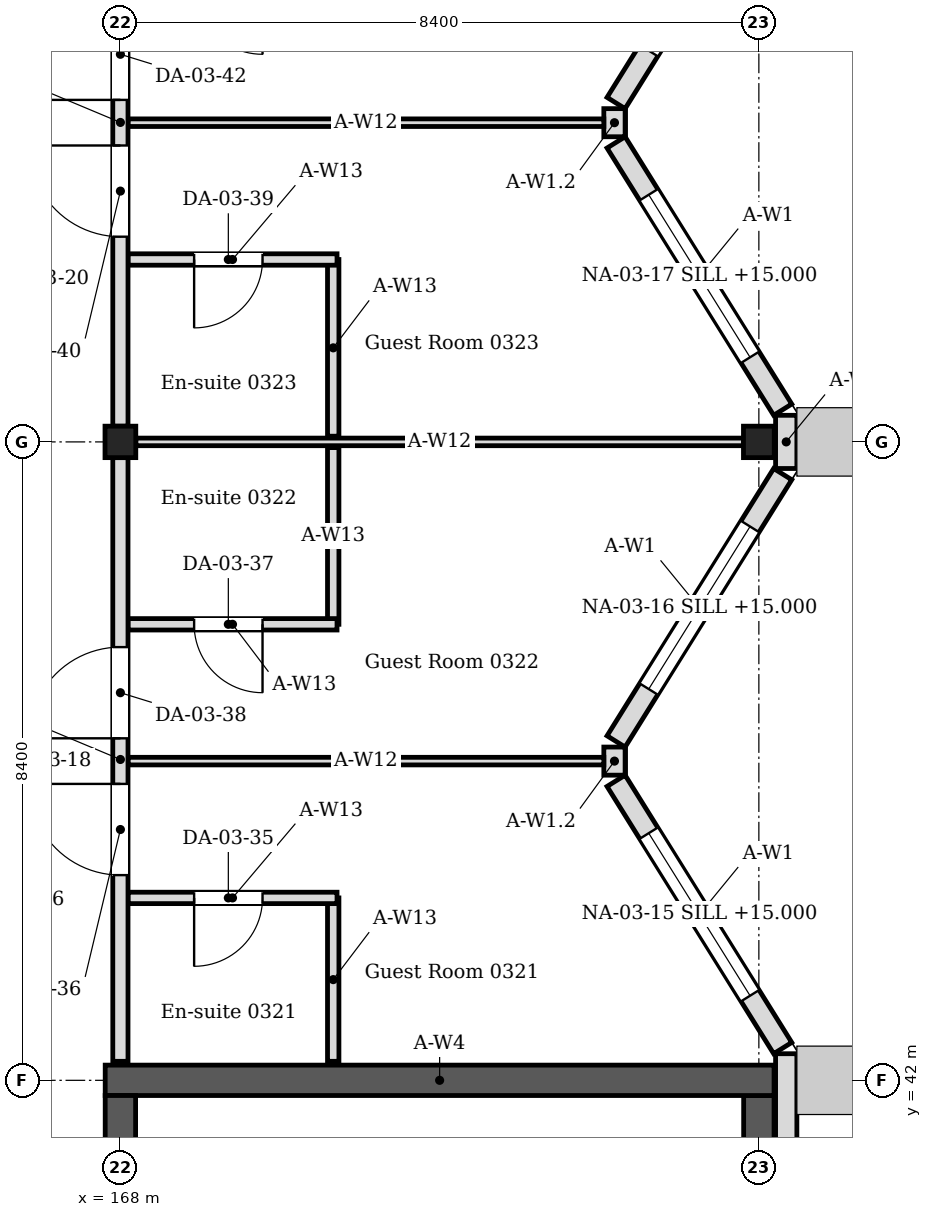
"""IFC4 building model, lengths in metres.
Left out: names, types, materials, properties, quantities, classifications, styles, units other than length and angle.
Written with IfcOpenShell. Run it as: python <this file> out.ifc"""

import sys

from ifc_helpers import new_model, si_unit, direction, frame, frame_2d, origin, origin_2d, place, context, subcontext, project, spatial, rectangle, i_section, extrude, element, fill, save


model = new_model("IFC4")
c1 = context("Model", 3, precision=1e-05, world=origin(), true_north=direction((0.0, 1.0)))
c2 = subcontext(c1, "Body", "Model", "MODEL_VIEW")
j1 = project(units=[si_unit("LENGTHUNIT", "METRE"), si_unit("PLANEANGLEUNIT", "RADIAN")], contexts=[c1])
p1 = place(None, origin())
s1 = spatial("IfcSite", under=j1, at=p1, CompositionType="ELEMENT")
p2 = place(p1, origin())
s2 = spatial("IfcBuilding", under=s1, at=p2, CompositionType="ELEMENT")
p3 = place(p2, frame((0.0, 0.0, 14.4)))
s3 = spatial("IfcBuildingStorey", under=s2, at=p3, CompositionType="ELEMENT", Elevation=14.4)
for number, where, z_axis, x_axis in (
    (1, (168.0, 50.4, 0.0), (0.0, 0.0, 1.0), (1.0, 0.0, 0.0)),
    (2, (176.4, 50.4, 0.0), (0.0, 0.0, 1.0), (1.0, 0.0, 0.0)),
):
    element("IfcColumn", number, at=place(p3, frame(where, z_axis=z_axis, x_axis=x_axis)), inside=s3, PredefinedType="COLUMN", context=c2, shape_type="SweptSolid", body=[
        extrude(i_section(OverallWidth=0.405, OverallDepth=0.414, WebThickness=0.018, FlangeThickness=0.028, FilletRadius=0.022, at=origin_2d()), origin(), (0.0, 0.0, 1.0), 4.2),
    ])
p4 = place(p3, frame((167.8, 42.0, 0.0), z_axis=(0.0, 0.0, 1.0), x_axis=(1.0, 0.0, 0.0)))
e3 = element("IfcWall", 3, at=p4, inside=s3, PredefinedType="SOLIDWALL", context=c2, shape_type="SweptSolid", body=[
    extrude(rectangle(XDim=8.8, YDim=0.4, at=frame_2d((4.4, 0.0))), origin(), (0.0, 0.0, 1.0), 4.05),
])
p5 = place(p3, frame((168.0, 25.4, 0.0), z_axis=(0.0, 0.0, 1.0), x_axis=(0.0, 1.0, 0.0)))
e4 = element("IfcWall", 4, at=p5, inside=s3, PredefinedType="SOLIDWALL", context=c2, shape_type="SweptSolid", body=[
    extrude(rectangle(XDim=16.4, YDim=0.4, at=frame_2d((8.2, 0.0))), origin(), (0.0, 0.0, 1.0), 4.05),
])
p6 = place(p5, frame((1.0, 0.0, 0.0)))
e5 = element("IfcOpeningElement", 5, at=p6, cuts=e4, PredefinedType="OPENING", context=c2, shape_type="SweptSolid", body=[
    extrude(rectangle(XDim=1.0, YDim=2.1, at=frame_2d((0.5, 1.05))), frame((0.0, 0.21, 0.0), z_axis=(0.0, -1.0, 0.0), x_axis=(1.0, 0.0, 0.0)), (0.0, 0.0, 1.0), 0.42),
])
p7 = place(p5, frame((14.4, 0.0, 0.0)))
e6 = element("IfcOpeningElement", 6, at=p7, cuts=e4, PredefinedType="OPENING", context=c2, shape_type="SweptSolid", body=[
    extrude(rectangle(XDim=1.4, YDim=2.1, at=frame_2d((0.7, 1.05))), frame((0.0, 0.21, 0.0), z_axis=(0.0, -1.0, 0.0), x_axis=(1.0, 0.0, 0.0)), (0.0, 0.0, 1.0), 0.42),
])
p8 = place(p3, frame((176.4, 25.4, 0.0), z_axis=(0.0, 0.0, 1.0), x_axis=(0.0, 1.0, 0.0)))
e7 = element("IfcWall", 7, at=p8, inside=s3, PredefinedType="SOLIDWALL", context=c2, shape_type="SweptSolid", body=[
    extrude(rectangle(XDim=16.4, YDim=0.4, at=frame_2d((8.2, 0.0))), origin(), (0.0, 0.0, 1.0), 4.05),
])
p9 = place(p3, frame((176.76, -0.22, 0.0), z_axis=(0.0, 0.0, 1.0), x_axis=(0.0, 1.0, 0.0)))
e8 = element("IfcWall", 8, at=p9, inside=s3, PredefinedType="SOLIDWALL", context=c2, shape_type="SweptSolid", body=[
    extrude(rectangle(XDim=42.57, YDim=0.28, at=frame_2d((21.285, 0.0))), origin(), (0.0, 0.0, 1.0), 4.05),
])
p10 = place(p9, frame((9.46, 0.0, 0.6)))
e9 = element("IfcOpeningElement", 9, at=p10, cuts=e8, PredefinedType="OPENING", context=c2, shape_type="SweptSolid", body=[
    extrude(rectangle(XDim=2.52, YDim=2.4, at=frame_2d((1.26, 1.2))), frame((0.0, 0.15, 0.0), z_axis=(0.0, -1.0, 0.0), x_axis=(1.0, 0.0, 0.0)), (0.0, 0.0, 1.0), 0.3),
])
p11 = place(p9, frame((13.66, 0.0, 0.6)))
e10 = element("IfcOpeningElement", 10, at=p11, cuts=e8, PredefinedType="OPENING", context=c2, shape_type="SweptSolid", body=[
    extrude(rectangle(XDim=2.52, YDim=2.4, at=frame_2d((1.26, 1.2))), frame((0.0, 0.15, 0.0), z_axis=(0.0, -1.0, 0.0), x_axis=(1.0, 0.0, 0.0)), (0.0, 0.0, 1.0), 0.3),
])
p12 = place(p9, frame((17.44, 0.0, 0.6)))
e11 = element("IfcOpeningElement", 11, at=p12, cuts=e8, PredefinedType="OPENING", context=c2, shape_type="SweptSolid", body=[
    extrude(rectangle(XDim=2.52, YDim=2.4, at=frame_2d((1.26, 1.2))), frame((0.0, 0.15, 0.0), z_axis=(0.0, -1.0, 0.0), x_axis=(1.0, 0.0, 0.0)), (0.0, 0.0, 1.0), 0.3),
])
p13 = place(p9, frame((21.64, 0.0, 0.6)))
e12 = element("IfcOpeningElement", 12, at=p13, cuts=e8, PredefinedType="OPENING", context=c2, shape_type="SweptSolid", body=[
    extrude(rectangle(XDim=2.52, YDim=2.4, at=frame_2d((1.26, 1.2))), frame((0.0, 0.15, 0.0), z_axis=(0.0, -1.0, 0.0), x_axis=(1.0, 0.0, 0.0)), (0.0, 0.0, 1.0), 0.3),
])
p14 = place(p3, frame((176.714, 42.424, 0.0), z_axis=(0.0, 0.0, 1.0), x_axis=(-0.529018946142, 0.848610013271, 0.0)))
e13 = element("IfcWall", 13, at=p14, inside=s3, PredefinedType="SOLIDWALL", context=c2, shape_type="SweptSolid", body=[
    extrude(rectangle(XDim=4.144, YDim=0.28, at=frame_2d((2.072, 0.0))), origin(), (0.0, 0.0, 1.0), 4.05),
])
p15 = place(p14, frame((0.812, 0.0, 0.6)))
e14 = element("IfcOpeningElement", 14, at=p15, cuts=e13, PredefinedType="OPENING", context=c2, shape_type="SweptSolid", body=[
    extrude(rectangle(XDim=2.52, YDim=2.4, at=frame_2d((1.26, 1.2))), frame((0.0, 0.15, 0.0), z_axis=(0.0, -1.0, 0.0), x_axis=(1.0, 0.0, 0.0)), (0.0, 0.0, 1.0), 0.3),
])
p16 = place(p3, frame((174.521, 46.459, 0.0), z_axis=(0.0, 0.0, 1.0), x_axis=(0.529018946142, 0.848610013271, 0.0)))
e15 = element("IfcWall", 15, at=p16, inside=s3, PredefinedType="SOLIDWALL", context=c2, shape_type="SweptSolid", body=[
    extrude(rectangle(XDim=4.144, YDim=0.28, at=frame_2d((2.072, 0.0))), origin(), (0.0, 0.0, 1.0), 4.05),
])
p17 = place(p16, frame((0.812, 0.0, 0.6)))
e16 = element("IfcOpeningElement", 16, at=p17, cuts=e15, PredefinedType="OPENING", context=c2, shape_type="SweptSolid", body=[
    extrude(rectangle(XDim=2.52, YDim=2.4, at=frame_2d((1.26, 1.2))), frame((0.0, 0.15, 0.0), z_axis=(0.0, -1.0, 0.0), x_axis=(1.0, 0.0, 0.0)), (0.0, 0.0, 1.0), 0.3),
])
p18 = place(p3, frame((174.5, 46.015, 0.0), z_axis=(0.0, 0.0, 1.0), x_axis=(0.0, 1.0, 0.0)))
e17 = element("IfcWall", 17, at=p18, inside=s3, PredefinedType="SOLIDWALL", context=c2, shape_type="SweptSolid", body=[
    extrude(rectangle(XDim=0.37, YDim=0.28, at=frame_2d((0.185, 0.0))), origin(), (0.0, 0.0, 1.0), 3.604),
])
p19 = place(p3, frame((176.76, 50.05, 0.0), z_axis=(0.0, 0.0, 1.0), x_axis=(0.0, 1.0, 0.0)))
e18 = element("IfcWall", 18, at=p19, inside=s3, PredefinedType="SOLIDWALL", context=c2, shape_type="SweptSolid", body=[
    extrude(rectangle(XDim=0.7, YDim=0.28, at=frame_2d((0.35, 0.0))), origin(), (0.0, 0.0, 1.0), 4.05),
])
p20 = place(p3, frame((176.714, 50.824, 0.0), z_axis=(0.0, 0.0, 1.0), x_axis=(-0.529018946142, 0.848610013271, 0.0)))
e19 = element("IfcWall", 19, at=p20, inside=s3, PredefinedType="SOLIDWALL", context=c2, shape_type="SweptSolid", body=[
    extrude(rectangle(XDim=4.144, YDim=0.28, at=frame_2d((2.072, 0.0))), origin(), (0.0, 0.0, 1.0), 4.05),
])
p21 = place(p20, frame((0.812, 0.0, 0.6)))
e20 = element("IfcOpeningElement", 20, at=p21, cuts=e19, PredefinedType="OPENING", context=c2, shape_type="SweptSolid", body=[
    extrude(rectangle(XDim=2.52, YDim=2.4, at=frame_2d((1.26, 1.2))), frame((0.0, 0.15, 0.0), z_axis=(0.0, -1.0, 0.0), x_axis=(1.0, 0.0, 0.0)), (0.0, 0.0, 1.0), 0.3),
])
p22 = place(p3, frame((174.521, 54.859, 0.0), z_axis=(0.0, 0.0, 1.0), x_axis=(0.528992500338, 0.848626498871, 0.0)))
e21 = element("IfcWall", 21, at=p22, inside=s3, PredefinedType="SOLIDWALL", context=c2, shape_type="SweptSolid", body=[
    extrude(rectangle(XDim=4.145, YDim=0.28, at=frame_2d((2.072, 0.0))), origin(), (0.0, 0.0, 1.0), 4.05),
])
p23 = place(p22, frame((0.812, 0.0, 0.6)))
e22 = element("IfcOpeningElement", 22, at=p23, cuts=e21, PredefinedType="OPENING", context=c2, shape_type="SweptSolid", body=[
    extrude(rectangle(XDim=2.52, YDim=2.4, at=frame_2d((1.26, 1.2))), frame((0.0, 0.15, 0.0), z_axis=(0.0, -1.0, 0.0), x_axis=(1.0, 0.0, 0.0)), (0.0, 0.0, 1.0), 0.3),
])
p24 = place(p3, frame((174.5, 54.415, 0.0), z_axis=(0.0, 0.0, 1.0), x_axis=(0.0, 1.0, 0.0)))
e23 = element("IfcWall", 23, at=p24, inside=s3, PredefinedType="SOLIDWALL", context=c2, shape_type="SweptSolid", body=[
    extrude(rectangle(XDim=0.37, YDim=0.28, at=frame_2d((0.185, 0.0))), origin(), (0.0, 0.0, 1.0), 3.604),
])
p25 = place(p3, frame((170.8, 42.25, 0.0), z_axis=(0.0, 0.0, 1.0), x_axis=(0.0, 1.0, 0.0)))
e24 = element("IfcWall", 24, at=p25, inside=s3, PredefinedType="PARTITIONING", context=c2, shape_type="SweptSolid", body=[
    extrude(rectangle(XDim=2.15, YDim=0.15, at=frame_2d((1.075, 0.0))), origin(), (0.0, 0.0, 1.0), 4.05),
])
p26 = place(p3, frame((170.85, 44.4, 0.0), z_axis=(0.0, 0.0, 1.0), x_axis=(-1.0, 0.0, 0.0)))
e25 = element("IfcWall", 25, at=p26, inside=s3, PredefinedType="PARTITIONING", context=c2, shape_type="SweptSolid", body=[
    extrude(rectangle(XDim=2.75, YDim=0.15, at=frame_2d((1.375, 0.0))), origin(), (0.0, 0.0, 1.0), 4.05),
])
p27 = place(p26, frame((0.98, 0.0, 0.0)))
e26 = element("IfcOpeningElement", 26, at=p27, cuts=e25, PredefinedType="OPENING", context=c2, shape_type="SweptSolid", body=[
    extrude(rectangle(XDim=0.9, YDim=2.1, at=frame_2d((0.45, 1.05))), frame((0.0, 0.085, 0.0), z_axis=(0.0, -1.0, 0.0), x_axis=(1.0, 0.0, 0.0)), (0.0, 0.0, 1.0), 0.17),
])
p28 = place(p3, frame((170.8, 48.0, 0.0), z_axis=(0.0, 0.0, 1.0), x_axis=(0.0, 1.0, 0.0)))
e27 = element("IfcWall", 27, at=p28, inside=s3, PredefinedType="PARTITIONING", context=c2, shape_type="SweptSolid", body=[
    extrude(rectangle(XDim=2.325, YDim=0.15, at=frame_2d((1.163, 0.0))), origin(), (0.0, 0.0, 1.0), 4.05),
])
p29 = place(p3, frame((170.85, 48.0, 0.0), z_axis=(0.0, 0.0, 1.0), x_axis=(-1.0, 0.0, 0.0)))
e28 = element("IfcWall", 28, at=p29, inside=s3, PredefinedType="PARTITIONING", context=c2, shape_type="SweptSolid", body=[
    extrude(rectangle(XDim=2.75, YDim=0.15, at=frame_2d((1.375, 0.0))), origin(), (0.0, 0.0, 1.0), 4.05),
])
p30 = place(p29, frame((0.98, 0.0, 0.0)))
e29 = element("IfcOpeningElement", 29, at=p30, cuts=e28, PredefinedType="OPENING", context=c2, shape_type="SweptSolid", body=[
    extrude(rectangle(XDim=0.9, YDim=2.1, at=frame_2d((0.45, 1.05))), frame((0.0, 0.085, 0.0), z_axis=(0.0, -1.0, 0.0), x_axis=(1.0, 0.0, 0.0)), (0.0, 0.0, 1.0), 0.17),
])
p31 = place(p3, frame((170.8, 50.475, 0.0), z_axis=(0.0, 0.0, 1.0), x_axis=(0.0, 1.0, 0.0)))
e30 = element("IfcWall", 30, at=p31, inside=s3, PredefinedType="PARTITIONING", context=c2, shape_type="SweptSolid", body=[
    extrude(rectangle(XDim=2.325, YDim=0.15, at=frame_2d((1.163, 0.0))), origin(), (0.0, 0.0, 1.0), 4.05),
])
p32 = place(p3, frame((170.85, 52.8, 0.0), z_axis=(0.0, 0.0, 1.0), x_axis=(-1.0, 0.0, 0.0)))
e31 = element("IfcWall", 31, at=p32, inside=s3, PredefinedType="PARTITIONING", context=c2, shape_type="SweptSolid", body=[
    extrude(rectangle(XDim=2.75, YDim=0.15, at=frame_2d((1.375, 0.0))), origin(), (0.0, 0.0, 1.0), 4.05),
])
p33 = place(p32, frame((0.98, 0.0, 0.0)))
e32 = element("IfcOpeningElement", 32, at=p33, cuts=e31, PredefinedType="OPENING", context=c2, shape_type="SweptSolid", body=[
    extrude(rectangle(XDim=0.9, YDim=2.1, at=frame_2d((0.45, 1.05))), frame((0.0, 0.085, 0.0), z_axis=(0.0, -1.0, 0.0), x_axis=(1.0, 0.0, 0.0)), (0.0, 0.0, 1.0), 0.17),
])
p34 = place(p3, frame((168.202, 50.4, 0.0), z_axis=(0.0, 0.0, 1.0), x_axis=(1.0, 0.0, 0.0)))
e33 = element("IfcWall", 33, at=p34, inside=s3, PredefinedType="PARTITIONING", context=c2, shape_type="SweptSolid", body=[
    extrude(rectangle(XDim=7.995, YDim=0.1, at=frame_2d((3.998, 0.0))), origin(), (0.0, 0.0, 1.0), 3.604),
])
for number, where, z_axis, x_axis in (
    (34, (168.1, 46.2, 0.0), (0.0, 0.0, 1.0), (1.0, 0.0, 0.0)),
    (35, (168.1, 54.6, 0.0), (0.0, 0.0, 1.0), (1.0, 0.0, 0.0)),
):
    element("IfcWall", number, at=place(p3, frame(where, z_axis=z_axis, x_axis=x_axis)), inside=s3, PredefinedType="PARTITIONING", context=c2, shape_type="SweptSolid", body=[
        extrude(rectangle(XDim=6.26, YDim=0.1, at=frame_2d((3.13, 0.0))), origin(), (0.0, 0.0, 1.0), 3.604),
    ])
p35 = place(p3, frame((168.0, 42.25, 0.0), z_axis=(0.0, 0.0, 1.0), x_axis=(0.0, 1.0, 0.0)))
e36 = element("IfcWall", 36, at=p35, inside=s3, PredefinedType="PARTITIONING", context=c2, shape_type="SweptSolid", body=[
    extrude(rectangle(XDim=7.943, YDim=0.2, at=frame_2d((3.972, 0.0))), origin(), (0.0, 0.0, 1.0), 3.45),
])
p36 = place(p35, frame((2.45, 0.0, 0.0)))
e37 = element("IfcOpeningElement", 37, at=p36, cuts=e36, PredefinedType="OPENING", context=c2, shape_type="SweptSolid", body=[
    extrude(rectangle(XDim=1.2, YDim=2.1, at=frame_2d((0.6, 1.05))), frame((0.0, 0.11, 0.0), z_axis=(0.0, -1.0, 0.0), x_axis=(1.0, 0.0, 0.0)), (0.0, 0.0, 1.0), 0.22),
])
p37 = place(p35, frame((4.25, 0.0, 0.0)))
e38 = element("IfcOpeningElement", 38, at=p37, cuts=e36, PredefinedType="OPENING", context=c2, shape_type="SweptSolid", body=[
    extrude(rectangle(XDim=1.2, YDim=2.1, at=frame_2d((0.6, 1.05))), frame((0.0, 0.11, 0.0), z_axis=(0.0, -1.0, 0.0), x_axis=(1.0, 0.0, 0.0)), (0.0, 0.0, 1.0), 0.22),
])
p38 = place(p3, frame((168.0, 50.607, 0.0), z_axis=(0.0, 0.0, 1.0), x_axis=(0.0, 1.0, 0.0)))
e39 = element("IfcWall", 39, at=p38, inside=s3, PredefinedType="PARTITIONING", context=c2, shape_type="SweptSolid", body=[
    extrude(rectangle(XDim=7.993, YDim=0.2, at=frame_2d((3.997, 0.0))), origin(), (0.0, 0.0, 1.0), 3.45),
])
p39 = place(p38, frame((2.493, 0.0, 0.0)))
e40 = element("IfcOpeningElement", 40, at=p39, cuts=e39, PredefinedType="OPENING", context=c2, shape_type="SweptSolid", body=[
    extrude(rectangle(XDim=1.2, YDim=2.1, at=frame_2d((0.6, 1.05))), frame((0.0, 0.11, 0.0), z_axis=(0.0, -1.0, 0.0), x_axis=(1.0, 0.0, 0.0)), (0.0, 0.0, 1.0), 0.22),
])
p40 = place(p38, frame((4.293, 0.0, 0.0)))
e41 = element("IfcOpeningElement", 41, at=p40, cuts=e39, PredefinedType="OPENING", context=c2, shape_type="SweptSolid", body=[
    extrude(rectangle(XDim=1.2, YDim=2.1, at=frame_2d((0.6, 1.05))), frame((0.0, 0.11, 0.0), z_axis=(0.0, -1.0, 0.0), x_axis=(1.0, 0.0, 0.0)), (0.0, 0.0, 1.0), 0.22),
])
p41 = place(p15, origin())
e42 = element("IfcWindow", 42, at=p41, inside=s3, PartitioningType="SINGLE_PANEL", PredefinedType="WINDOW", context=c2, shape_type="SweptSolid", body=[
    extrude(rectangle(XDim=2.52, YDim=2.4, at=frame_2d((1.26, 1.2))), frame((0.0, 0.03, 0.0), z_axis=(0.0, -1.0, 0.0), x_axis=(1.0, 0.0, 0.0)), (0.0, 0.0, 1.0), 0.06),
])
fill(e14, e42)
p42 = place(p17, origin())
e43 = element("IfcWindow", 43, at=p42, inside=s3, PartitioningType="SINGLE_PANEL", PredefinedType="WINDOW", context=c2, shape_type="SweptSolid", body=[
    extrude(rectangle(XDim=2.52, YDim=2.4, at=frame_2d((1.26, 1.2))), frame((0.0, 0.03, 0.0), z_axis=(0.0, -1.0, 0.0), x_axis=(1.0, 0.0, 0.0)), (0.0, 0.0, 1.0), 0.06),
])
fill(e16, e43)
p43 = place(p21, origin())
e44 = element("IfcWindow", 44, at=p43, inside=s3, PartitioningType="SINGLE_PANEL", PredefinedType="WINDOW", context=c2, shape_type="SweptSolid", body=[
    extrude(rectangle(XDim=2.52, YDim=2.4, at=frame_2d((1.26, 1.2))), frame((0.0, 0.03, 0.0), z_axis=(0.0, -1.0, 0.0), x_axis=(1.0, 0.0, 0.0)), (0.0, 0.0, 1.0), 0.06),
])
fill(e20, e44)
p44 = place(p27, origin())
e45 = element("IfcDoor", 45, at=p44, inside=s3, OperationType="SINGLE_SWING_RIGHT", PredefinedType="DOOR", context=c2, shape_type="SweptSolid", body=[
    extrude(rectangle(XDim=0.9, YDim=2.1, at=frame_2d((0.45, 1.05))), frame((0.0, 0.025, 0.0), z_axis=(0.0, -1.0, 0.0), x_axis=(1.0, 0.0, 0.0)), (0.0, 0.0, 1.0), 0.05),
])
fill(e26, e45)
p45 = place(p36, origin())
e46 = element("IfcDoor", 46, at=p45, inside=s3, OperationType="SINGLE_SWING_RIGHT", PredefinedType="DOOR", context=c2, shape_type="SweptSolid", body=[
    extrude(rectangle(XDim=1.2, YDim=2.1, at=frame_2d((0.6, 1.05))), frame((0.0, 0.025, 0.0), z_axis=(0.0, -1.0, 0.0), x_axis=(1.0, 0.0, 0.0)), (0.0, 0.0, 1.0), 0.05),
])
fill(e37, e46)
p46 = place(p30, origin())
e47 = element("IfcDoor", 47, at=p46, inside=s3, OperationType="SINGLE_SWING_LEFT", PredefinedType="DOOR", context=c2, shape_type="SweptSolid", body=[
    extrude(rectangle(XDim=0.9, YDim=2.1, at=frame_2d((0.45, 1.05))), frame((0.0, 0.025, 0.0), z_axis=(0.0, -1.0, 0.0), x_axis=(1.0, 0.0, 0.0)), (0.0, 0.0, 1.0), 0.05),
])
fill(e29, e47)
p47 = place(p37, origin())
e48 = element("IfcDoor", 48, at=p47, inside=s3, OperationType="SINGLE_SWING_LEFT", PredefinedType="DOOR", context=c2, shape_type="SweptSolid", body=[
    extrude(rectangle(XDim=1.2, YDim=2.1, at=frame_2d((0.6, 1.05))), frame((0.0, 0.025, 0.0), z_axis=(0.0, -1.0, 0.0), x_axis=(1.0, 0.0, 0.0)), (0.0, 0.0, 1.0), 0.05),
])
fill(e38, e48)
p48 = place(p33, origin())
e49 = element("IfcDoor", 49, at=p48, inside=s3, OperationType="SINGLE_SWING_RIGHT", PredefinedType="DOOR", context=c2, shape_type="SweptSolid", body=[
    extrude(rectangle(XDim=0.9, YDim=2.1, at=frame_2d((0.45, 1.05))), frame((0.0, 0.025, 0.0), z_axis=(0.0, -1.0, 0.0), x_axis=(1.0, 0.0, 0.0)), (0.0, 0.0, 1.0), 0.05),
])
fill(e32, e49)
p49 = place(p39, origin())
e50 = element("IfcDoor", 50, at=p49, inside=s3, OperationType="SINGLE_SWING_RIGHT", PredefinedType="DOOR", context=c2, shape_type="SweptSolid", body=[
    extrude(rectangle(XDim=1.2, YDim=2.1, at=frame_2d((0.6, 1.05))), frame((0.0, 0.025, 0.0), z_axis=(0.0, -1.0, 0.0), x_axis=(1.0, 0.0, 0.0)), (0.0, 0.0, 1.0), 0.05),
])
fill(e40, e50)
p50 = place(p40, origin())
e51 = element("IfcDoor", 51, at=p50, inside=s3, OperationType="SINGLE_SWING_LEFT", PredefinedType="DOOR", context=c2, shape_type="SweptSolid", body=[
    extrude(rectangle(XDim=1.2, YDim=2.1, at=frame_2d((0.6, 1.05))), frame((0.0, 0.025, 0.0), z_axis=(0.0, -1.0, 0.0), x_axis=(1.0, 0.0, 0.0)), (0.0, 0.0, 1.0), 0.05),
])
fill(e41, e51)
save(model, sys.argv[1])
